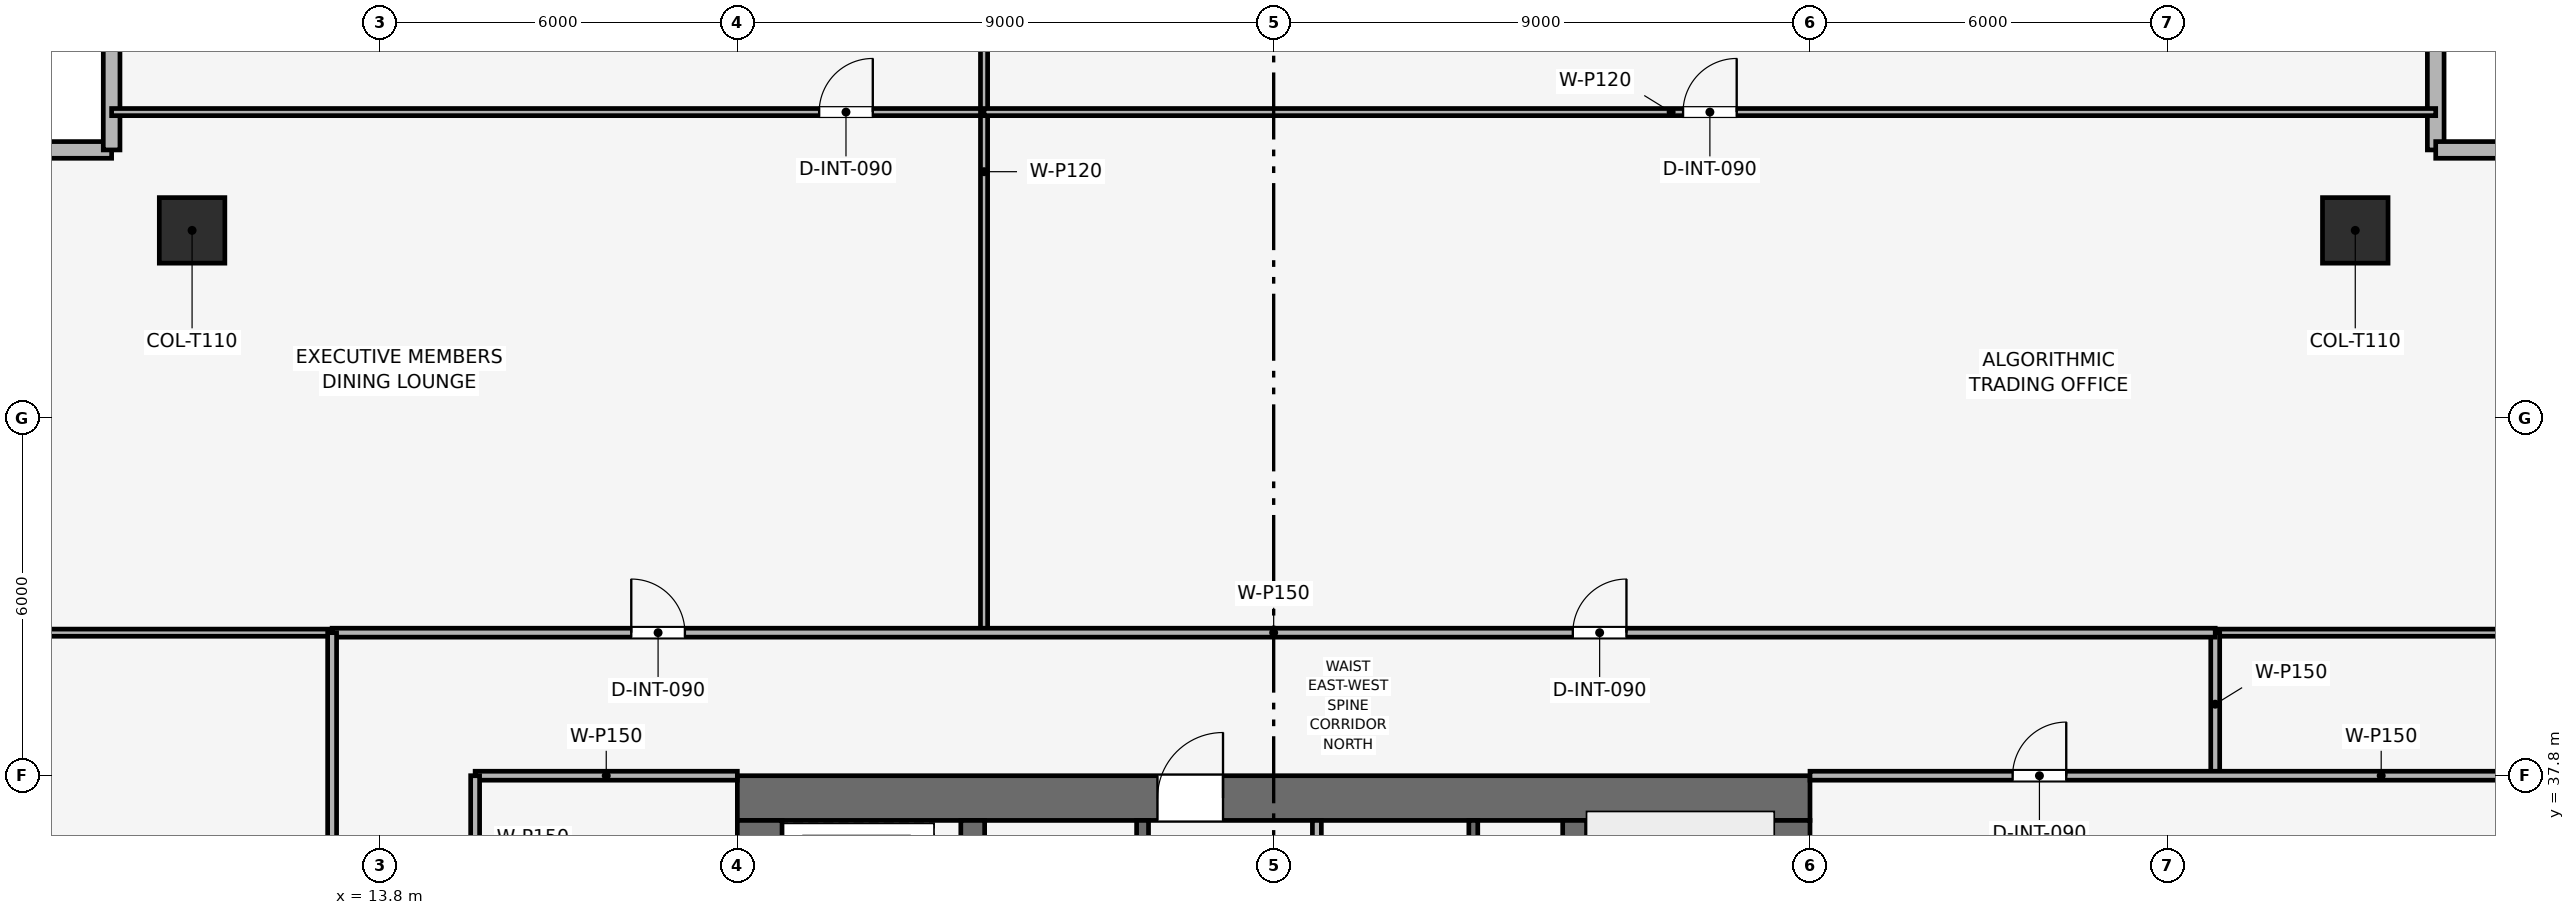
"""IFC4 building model, lengths in metres.
Left out: names, types, materials, properties, quantities, classifications, styles, units other than length and angle.
Written with IfcOpenShell. Run it as: python <this file> out.ifc"""

import sys

from ifc_helpers import new_model, si_unit, direction, frame, frame_2d, origin, origin_2d, place, context, subcontext, project, spatial, rectangle, extrude, element, fill, save


model = new_model("IFC4")
c1 = context("Model", 3, precision=1e-05, world=origin(), true_north=direction((0.0, 1.0)))
c2 = subcontext(c1, "Body", "Model", "MODEL_VIEW")
j1 = project(units=[si_unit("LENGTHUNIT", "METRE"), si_unit("PLANEANGLEUNIT", "RADIAN")], contexts=[c1])
p1 = place(None, origin())
s1 = spatial("IfcSite", under=j1, at=p1, CompositionType="ELEMENT")
p2 = place(p1, origin())
s2 = spatial("IfcBuilding", under=s1, at=p2, CompositionType="ELEMENT")
p3 = place(p2, frame((0.0, 0.0, 237.45)))
s3 = spatial("IfcBuildingStorey", under=s2, at=p3, CompositionType="ELEMENT", Elevation=237.45)
p4 = place(p3, frame((19.8, 37.425, 0.0), z_axis=(0.0, 0.0, 1.0), x_axis=(1.0, 0.0, 0.0)))
e1 = element("IfcWall", 1, at=p4, inside=s3, PredefinedType="SHEAR", context=c2, shape_type="SweptSolid", body=[
    extrude(rectangle(XDim=18.0, YDim=0.75, at=frame_2d((9.0, 0.0))), origin(), (0.0, 0.0, 1.0), 3.75),
])
p5 = place(p4, frame((7.05, 0.0, 0.0)))
e2 = element("IfcOpeningElement", 2, at=p5, cuts=e1, PredefinedType="OPENING", context=c2, shape_type="SweptSolid", body=[
    extrude(rectangle(XDim=1.1, YDim=2.15, at=frame_2d((0.55, 1.075))), frame((0.0, 0.385, 0.0), z_axis=(0.0, -1.0, 0.0), x_axis=(1.0, 0.0, 0.0)), (0.0, 0.0, 1.0), 0.77),
])
p6 = place(p3, frame((20.175, 20.55, 0.0), z_axis=(0.0, 0.0, 1.0), x_axis=(0.0, 1.0, 0.0)))
e3 = element("IfcWall", 3, at=p6, inside=s3, PredefinedType="SHEAR", context=c2, shape_type="SweptSolid", body=[
    extrude(rectangle(XDim=16.5, YDim=0.75, at=frame_2d((8.25, 0.0))), origin(), (0.0, 0.0, 1.0), 3.75),
])
p7 = place(p6, frame((10.25, 0.0, 0.0)))
e4 = element("IfcOpeningElement", 4, at=p7, cuts=e3, PredefinedType="OPENING", context=c2, shape_type="SweptSolid", body=[
    extrude(rectangle(XDim=1.1, YDim=2.15, at=frame_2d((0.55, 1.075))), frame((0.0, 0.385, 0.0), z_axis=(0.0, -1.0, 0.0), x_axis=(1.0, 0.0, 0.0)), (0.0, 0.0, 1.0), 0.77),
])
p8 = place(p3, frame((37.425, 20.55, 0.0), z_axis=(0.0, 0.0, 1.0), x_axis=(0.0, 1.0, 0.0)))
e5 = element("IfcWall", 5, at=p8, inside=s3, PredefinedType="SHEAR", context=c2, shape_type="SweptSolid", body=[
    extrude(rectangle(XDim=16.5, YDim=0.75, at=frame_2d((8.25, 0.0))), origin(), (0.0, 0.0, 1.0), 3.75),
])
p9 = place(p8, frame((4.75, 0.0, 0.0)))
e6 = element("IfcOpeningElement", 6, at=p9, cuts=e5, PredefinedType="OPENING", context=c2, shape_type="SweptSolid", body=[
    extrude(rectangle(XDim=1.1, YDim=2.15, at=frame_2d((0.55, 1.075))), frame((0.0, 0.385, 0.0), z_axis=(0.0, -1.0, 0.0), x_axis=(1.0, 0.0, 0.0)), (0.0, 0.0, 1.0), 0.77),
])
for number, where, z_axis, x_axis in (
    (7, (23.75, 20.55, 0.0), (0.0, 0.0, 1.0), (0.0, 1.0, 0.0)),
    (8, (33.85, 20.55, 0.0), (0.0, 0.0, 1.0), (0.0, 1.0, 0.0)),
):
    element("IfcWall", number, at=place(p3, frame(where, z_axis=z_axis, x_axis=x_axis)), inside=s3, PredefinedType="SHEAR", context=c2, shape_type="SweptSolid", body=[
        extrude(rectangle(XDim=16.5, YDim=0.4, at=frame_2d((8.25, 0.0))), origin(), (0.0, 0.0, 1.0), 3.75),
    ])
for number, where, z_axis, x_axis in (
    (9, (46.95, 46.95, 0.003), (0.0, 0.0, 1.0), (1.0, 0.0, 0.0)),
    (10, (10.65, 46.95, 0.003), (0.0, 0.0, 1.0), (1.0, 0.0, 0.0)),
):
    element("IfcColumn", number, at=place(p3, frame(where, z_axis=z_axis, x_axis=x_axis)), inside=s3, PredefinedType="COLUMN", context=c2, shape_type="SweptSolid", body=[
        extrude(rectangle(XDim=1.1, YDim=1.1, at=origin_2d()), origin(), (0.0, 0.0, 1.0), 3.494),
    ])
p10 = place(p3, frame((1.93, 48.3, 0.0), z_axis=(0.0, 0.0, 1.0), x_axis=(1.0, 0.0, 0.0)))
e11 = element("IfcWall", 11, at=p10, inside=s3, PredefinedType="SOLIDWALL", context=c2, shape_type="SweptSolid", body=[
    extrude(rectangle(XDim=7.37, YDim=0.28, at=frame_2d((3.685, 0.0))), origin(), (0.0, 0.0, 1.0), 3.5),
])
p11 = place(p10, frame((2.435, 0.0, 0.72)))
e12 = element("IfcOpeningElement", 12, at=p11, cuts=e11, PredefinedType="OPENING", context=c2, shape_type="SweptSolid", body=[
    extrude(rectangle(XDim=2.5, YDim=1.9, at=frame_2d((1.25, 0.95))), frame((0.0, 0.15, 0.0), z_axis=(0.0, -1.0, 0.0), x_axis=(1.0, 0.0, 0.0)), (0.0, 0.0, 1.0), 0.3),
])
p12 = place(p3, frame((9.3, 48.3, 0.0), z_axis=(0.0, 0.0, 1.0), x_axis=(0.0, 1.0, 0.0)))
e13 = element("IfcWall", 13, at=p12, inside=s3, PredefinedType="SOLIDWALL", context=c2, shape_type="SweptSolid", body=[
    extrude(rectangle(XDim=7.37, YDim=0.28, at=frame_2d((3.685, 0.0))), origin(), (0.0, 0.0, 1.0), 3.5),
])
p13 = place(p12, frame((2.435, 0.0, 0.72)))
e14 = element("IfcOpeningElement", 14, at=p13, cuts=e13, PredefinedType="OPENING", context=c2, shape_type="SweptSolid", body=[
    extrude(rectangle(XDim=2.5, YDim=1.9, at=frame_2d((1.25, 0.95))), frame((0.0, 0.15, 0.0), z_axis=(0.0, -1.0, 0.0), x_axis=(1.0, 0.0, 0.0)), (0.0, 0.0, 1.0), 0.3),
])
p14 = place(p3, frame((48.3, 55.67, 0.0), z_axis=(0.0, 0.0, 1.0), x_axis=(0.0, -1.0, 0.0)))
e15 = element("IfcWall", 15, at=p14, inside=s3, PredefinedType="SOLIDWALL", context=c2, shape_type="SweptSolid", body=[
    extrude(rectangle(XDim=7.37, YDim=0.28, at=frame_2d((3.685, 0.0))), origin(), (0.0, 0.0, 1.0), 3.5),
])
p15 = place(p14, frame((2.435, 0.0, 0.72)))
e16 = element("IfcOpeningElement", 16, at=p15, cuts=e15, PredefinedType="OPENING", context=c2, shape_type="SweptSolid", body=[
    extrude(rectangle(XDim=2.5, YDim=1.9, at=frame_2d((1.25, 0.95))), frame((0.0, 0.15, 0.0), z_axis=(0.0, -1.0, 0.0), x_axis=(1.0, 0.0, 0.0)), (0.0, 0.0, 1.0), 0.3),
])
p16 = place(p3, frame((48.3, 48.3, 0.0), z_axis=(0.0, 0.0, 1.0), x_axis=(1.0, 0.0, 0.0)))
e17 = element("IfcWall", 17, at=p16, inside=s3, PredefinedType="SOLIDWALL", context=c2, shape_type="SweptSolid", body=[
    extrude(rectangle(XDim=7.37, YDim=0.28, at=frame_2d((3.685, 0.0))), origin(), (0.0, 0.0, 1.0), 3.5),
])
p17 = place(p16, frame((2.435, 0.0, 0.72)))
e18 = element("IfcOpeningElement", 18, at=p17, cuts=e17, PredefinedType="OPENING", context=c2, shape_type="SweptSolid", body=[
    extrude(rectangle(XDim=2.5, YDim=1.9, at=frame_2d((1.25, 0.95))), frame((0.0, 0.15, 0.0), z_axis=(0.0, -1.0, 0.0), x_axis=(1.0, 0.0, 0.0)), (0.0, 0.0, 1.0), 0.3),
])
p18 = place(p3, frame((32.15, 34.0, 0.0), z_axis=(0.0, 0.0, 1.0), x_axis=(0.0, 1.0, 0.0)))
e19 = element("IfcWall", 19, at=p18, inside=s3, PredefinedType="SHEAR", context=c2, shape_type="SweptSolid", body=[
    extrude(rectangle(XDim=3.05, YDim=0.15, at=frame_2d((1.525, 0.0))), origin(), (0.0, 0.0, 1.0), 3.5),
])
p19 = place(p3, frame((26.6, 34.0, 0.0), z_axis=(0.0, 0.0, 1.0), x_axis=(0.0, 1.0, 0.0)))
e20 = element("IfcWall", 20, at=p19, inside=s3, PredefinedType="SHEAR", context=c2, shape_type="SweptSolid", body=[
    extrude(rectangle(XDim=3.05, YDim=0.2, at=frame_2d((1.525, 0.0))), origin(), (0.0, 0.0, 1.0), 3.5),
])
p20 = place(p19, frame((0.75, 0.0, 0.0)))
e21 = element("IfcOpeningElement", 21, at=p20, cuts=e20, PredefinedType="OPENING", context=c2, shape_type="SweptSolid", body=[
    extrude(rectangle(XDim=1.1, YDim=2.15, at=frame_2d((0.55, 1.075))), frame((0.0, 0.11, 0.0), z_axis=(0.0, -1.0, 0.0), x_axis=(1.0, 0.0, 0.0)), (0.0, 0.0, 1.0), 0.22),
])
p21 = place(p3, frame((29.525, 33.925, 0.0), z_axis=(0.0, 0.0, 1.0), x_axis=(0.0, 1.0, 0.0)))
e22 = element("IfcWall", 22, at=p21, inside=s3, PredefinedType="PARTITIONING", context=c2, shape_type="SweptSolid", body=[
    extrude(rectangle(XDim=3.125, YDim=0.15, at=frame_2d((1.562, 0.0))), origin(), (0.0, 0.0, 1.0), 3.5),
])
p22 = place(p21, frame((0.85, 0.0, 0.0)))
e23 = element("IfcOpeningElement", 23, at=p22, cuts=e22, PredefinedType="OPENING", context=c2, shape_type="SweptSolid", body=[
    extrude(rectangle(XDim=0.9, YDim=2.1, at=frame_2d((0.45, 1.05))), frame((0.0, 0.085, 0.0), z_axis=(0.0, -1.0, 0.0), x_axis=(1.0, 0.0, 0.0)), (0.0, 0.0, 1.0), 0.17),
])
p23 = place(p3, frame((15.4, 37.8, 0.0), z_axis=(0.0, 0.0, 1.0), x_axis=(1.0, 0.0, 0.0)))
e24 = element("IfcWall", 24, at=p23, inside=s3, PredefinedType="PARTITIONING", context=c2, shape_type="SweptSolid", body=[
    extrude(rectangle(XDim=4.4, YDim=0.15, at=frame_2d((2.2, 0.0))), origin(), (0.0, 0.0, 1.0), 3.035),
])
p24 = place(p3, frame((15.4, 32.45, 0.0), z_axis=(0.0, 0.0, 1.0), x_axis=(0.0, 1.0, 0.0)))
e25 = element("IfcWall", 25, at=p24, inside=s3, PredefinedType="PARTITIONING", context=c2, shape_type="SweptSolid", body=[
    extrude(rectangle(XDim=5.35, YDim=0.15, at=frame_2d((2.675, 0.0))), origin(), (0.0, 0.0, 1.0), 3.035),
])
p25 = place(p24, frame((2.1, 0.0, 0.0)))
e26 = element("IfcOpeningElement", 26, at=p25, cuts=e25, PredefinedType="OPENING", context=c2, shape_type="SweptSolid", body=[
    extrude(rectangle(XDim=0.9, YDim=2.1, at=frame_2d((0.45, 1.05))), frame((0.0, 0.085, 0.0), z_axis=(0.0, -1.0, 0.0), x_axis=(1.0, 0.0, 0.0)), (0.0, 0.0, 1.0), 0.17),
])
p26 = place(p3, frame((9.3, 48.935, 0.0), z_axis=(0.0, 0.0, 1.0), x_axis=(1.0, 0.0, 0.0)))
e27 = element("IfcWall", 27, at=p26, inside=s3, PredefinedType="PARTITIONING", context=c2, shape_type="SweptSolid", body=[
    extrude(rectangle(XDim=14.64, YDim=0.12, at=frame_2d((7.32, 0.0))), origin(), (0.0, 0.0, 1.0), 2.685),
])
p27 = place(p26, frame((11.873, 0.0, 0.0)))
e28 = element("IfcOpeningElement", 28, at=p27, cuts=e27, PredefinedType="OPENING", context=c2, shape_type="SweptSolid", body=[
    extrude(rectangle(XDim=0.9, YDim=2.1, at=frame_2d((0.45, 1.05))), frame((0.0, 0.07, 0.0), z_axis=(0.0, -1.0, 0.0), x_axis=(1.0, 0.0, 0.0)), (0.0, 0.0, 1.0), 0.14),
])
p28 = place(p3, frame((23.94, 40.2, 0.0), z_axis=(0.0, 0.0, 1.0), x_axis=(0.0, 1.0, 0.0)))
e29 = element("IfcWall", 29, at=p28, inside=s3, PredefinedType="PARTITIONING", context=c2, shape_type="SweptSolid", body=[
    extrude(rectangle(XDim=15.47, YDim=0.12, at=frame_2d((7.735, 0.0))), origin(), (0.0, 0.0, 1.0), 2.685),
])
p29 = place(p3, frame((23.94, 48.935, 0.0), z_axis=(0.0, 0.0, 1.0), x_axis=(1.0, 0.0, 0.0)))
e30 = element("IfcWall", 30, at=p29, inside=s3, PredefinedType="PARTITIONING", context=c2, shape_type="SweptSolid", body=[
    extrude(rectangle(XDim=24.36, YDim=0.12, at=frame_2d((12.18, 0.0))), origin(), (0.0, 0.0, 1.0), 2.685),
])
p30 = place(p29, frame((11.73, 0.0, 0.0)))
e31 = element("IfcOpeningElement", 31, at=p30, cuts=e30, PredefinedType="OPENING", context=c2, shape_type="SweptSolid", body=[
    extrude(rectangle(XDim=0.9, YDim=2.1, at=frame_2d((0.45, 1.05))), frame((0.0, 0.07, 0.0), z_axis=(0.0, -1.0, 0.0), x_axis=(1.0, 0.0, 0.0)), (0.0, 0.0, 1.0), 0.14),
])
p31 = place(p3, frame((1.93, 40.2, 0.0), z_axis=(0.0, 0.0, 1.0), x_axis=(1.0, 0.0, 0.0)))
e32 = element("IfcWall", 32, at=p31, inside=s3, PredefinedType="PARTITIONING", context=c2, shape_type="SweptSolid", body=[
    extrude(rectangle(XDim=11.07, YDim=0.12, at=frame_2d((5.535, 0.0))), origin(), (0.0, 0.0, 1.0), 2.685),
])
p32 = place(p3, frame((44.6, 40.2, 0.0), z_axis=(0.0, 0.0, 1.0), x_axis=(1.0, 0.0, 0.0)))
e33 = element("IfcWall", 33, at=p32, inside=s3, PredefinedType="PARTITIONING", context=c2, shape_type="SweptSolid", body=[
    extrude(rectangle(XDim=11.07, YDim=0.12, at=frame_2d((5.535, 0.0))), origin(), (0.0, 0.0, 1.0), 2.685),
])
p33 = place(p3, frame((44.6, 37.8, 0.0), z_axis=(0.0, 0.0, 1.0), x_axis=(0.0, 1.0, 0.0)))
e34 = element("IfcWall", 34, at=p33, inside=s3, PredefinedType="PARTITIONING", context=c2, shape_type="SweptSolid", body=[
    extrude(rectangle(XDim=2.4, YDim=0.15, at=frame_2d((1.2, 0.0))), origin(), (0.0, 0.0, 1.0), 3.5),
])
p34 = place(p3, frame((37.8, 37.8, 0.0), z_axis=(0.0, 0.0, 1.0), x_axis=(1.0, 0.0, 0.0)))
e35 = element("IfcWall", 35, at=p34, inside=s3, PredefinedType="PARTITIONING", context=c2, shape_type="SweptSolid", body=[
    extrude(rectangle(XDim=17.87, YDim=0.15, at=frame_2d((8.935, 0.0))), origin(), (0.0, 0.0, 1.0), 2.685),
])
p35 = place(p34, frame((3.4, 0.0, 0.0)))
e36 = element("IfcOpeningElement", 36, at=p35, cuts=e35, PredefinedType="OPENING", context=c2, shape_type="SweptSolid", body=[
    extrude(rectangle(XDim=0.9, YDim=2.1, at=frame_2d((0.45, 1.05))), frame((0.0, 0.085, 0.0), z_axis=(0.0, -1.0, 0.0), x_axis=(1.0, 0.0, 0.0)), (0.0, 0.0, 1.0), 0.17),
])
p36 = place(p3, frame((13.0, 40.2, 0.0), z_axis=(0.0, 0.0, 1.0), x_axis=(1.0, 0.0, 0.0)))
e37 = element("IfcWall", 37, at=p36, inside=s3, PredefinedType="PARTITIONING", context=c2, shape_type="SweptSolid", body=[
    extrude(rectangle(XDim=31.6, YDim=0.15, at=frame_2d((15.8, 0.0))), origin(), (0.0, 0.0, 1.0), 3.035),
])
p37 = place(p36, frame((5.02, 0.0, 0.0)))
e38 = element("IfcOpeningElement", 38, at=p37, cuts=e37, PredefinedType="OPENING", context=c2, shape_type="SweptSolid", body=[
    extrude(rectangle(XDim=0.9, YDim=2.1, at=frame_2d((0.45, 1.05))), frame((0.0, 0.085, 0.0), z_axis=(0.0, -1.0, 0.0), x_axis=(1.0, 0.0, 0.0)), (0.0, 0.0, 1.0), 0.17),
])
p38 = place(p36, frame((20.82, 0.0, 0.0)))
e39 = element("IfcOpeningElement", 39, at=p38, cuts=e37, PredefinedType="OPENING", context=c2, shape_type="SweptSolid", body=[
    extrude(rectangle(XDim=0.9, YDim=2.1, at=frame_2d((0.45, 1.05))), frame((0.0, 0.085, 0.0), z_axis=(0.0, -1.0, 0.0), x_axis=(1.0, 0.0, 0.0)), (0.0, 0.0, 1.0), 0.17),
])
p39 = place(p3, frame((13.0, 17.4, 0.0), z_axis=(0.0, 0.0, 1.0), x_axis=(0.0, 1.0, 0.0)))
e40 = element("IfcWall", 40, at=p39, inside=s3, PredefinedType="PARTITIONING", context=c2, shape_type="SweptSolid", body=[
    extrude(rectangle(XDim=22.8, YDim=0.15, at=frame_2d((11.4, 0.0))), origin(), (0.0, 0.0, 1.0), 3.035),
])
p40 = place(p39, frame((3.1, 0.0, 0.0)))
e41 = element("IfcOpeningElement", 41, at=p40, cuts=e40, PredefinedType="OPENING", context=c2, shape_type="SweptSolid", body=[
    extrude(rectangle(XDim=0.9, YDim=2.1, at=frame_2d((0.45, 1.05))), frame((0.0, 0.085, 0.0), z_axis=(0.0, -1.0, 0.0), x_axis=(1.0, 0.0, 0.0)), (0.0, 0.0, 1.0), 0.17),
])
p41 = place(p39, frame((7.685, 0.0, 0.0)))
e42 = element("IfcOpeningElement", 42, at=p41, cuts=e40, PredefinedType="OPENING", context=c2, shape_type="SweptSolid", body=[
    extrude(rectangle(XDim=0.9, YDim=2.1, at=frame_2d((0.45, 1.05))), frame((0.0, 0.085, 0.0), z_axis=(0.0, -1.0, 0.0), x_axis=(1.0, 0.0, 0.0)), (0.0, 0.0, 1.0), 0.17),
])
p42 = place(p39, frame((15.535, 0.0, 0.0)))
e43 = element("IfcOpeningElement", 43, at=p42, cuts=e40, PredefinedType="OPENING", context=c2, shape_type="SweptSolid", body=[
    extrude(rectangle(XDim=0.9, YDim=2.1, at=frame_2d((0.45, 1.05))), frame((0.0, 0.085, 0.0), z_axis=(0.0, -1.0, 0.0), x_axis=(1.0, 0.0, 0.0)), (0.0, 0.0, 1.0), 0.17),
])
p43 = place(p27, origin())
e44 = element("IfcDoor", 44, at=p43, inside=s3, OperationType="SINGLE_SWING_RIGHT", PredefinedType="DOOR", context=c2, shape_type="SweptSolid", body=[
    extrude(rectangle(XDim=0.9, YDim=2.1, at=frame_2d((0.45, 1.05))), frame((0.0, 0.025, 0.0), z_axis=(0.0, -1.0, 0.0), x_axis=(1.0, 0.0, 0.0)), (0.0, 0.0, 1.0), 0.05),
])
fill(e28, e44)
p44 = place(p30, origin())
e45 = element("IfcDoor", 45, at=p44, inside=s3, OperationType="SINGLE_SWING_RIGHT", PredefinedType="DOOR", context=c2, shape_type="SweptSolid", body=[
    extrude(rectangle(XDim=0.9, YDim=2.1, at=frame_2d((0.45, 1.05))), frame((0.0, 0.025, 0.0), z_axis=(0.0, -1.0, 0.0), x_axis=(1.0, 0.0, 0.0)), (0.0, 0.0, 1.0), 0.05),
])
fill(e31, e45)
p45 = place(p35, origin())
e46 = element("IfcDoor", 46, at=p45, inside=s3, OperationType="SINGLE_SWING_RIGHT", PredefinedType="DOOR", context=c2, shape_type="SweptSolid", body=[
    extrude(rectangle(XDim=0.9, YDim=2.1, at=frame_2d((0.45, 1.05))), frame((0.0, 0.025, 0.0), z_axis=(0.0, -1.0, 0.0), x_axis=(1.0, 0.0, 0.0)), (0.0, 0.0, 1.0), 0.05),
])
fill(e36, e46)
p46 = place(p37, origin())
e47 = element("IfcDoor", 47, at=p46, inside=s3, OperationType="SINGLE_SWING_LEFT", PredefinedType="DOOR", context=c2, shape_type="SweptSolid", body=[
    extrude(rectangle(XDim=0.9, YDim=2.1, at=frame_2d((0.45, 1.05))), frame((0.0, 0.025, 0.0), z_axis=(0.0, -1.0, 0.0), x_axis=(1.0, 0.0, 0.0)), (0.0, 0.0, 1.0), 0.05),
])
fill(e38, e47)
p47 = place(p38, origin())
e48 = element("IfcDoor", 48, at=p47, inside=s3, OperationType="SINGLE_SWING_RIGHT", PredefinedType="DOOR", context=c2, shape_type="SweptSolid", body=[
    extrude(rectangle(XDim=0.9, YDim=2.1, at=frame_2d((0.45, 1.05))), frame((0.0, 0.025, 0.0), z_axis=(0.0, -1.0, 0.0), x_axis=(1.0, 0.0, 0.0)), (0.0, 0.0, 1.0), 0.05),
])
fill(e39, e48)
p48 = place(p5, origin())
e49 = element("IfcDoor", 49, at=p48, inside=s3, OperationType="SINGLE_SWING_RIGHT", PredefinedType="DOOR", context=c2, shape_type="SweptSolid", body=[
    extrude(rectangle(XDim=1.1, YDim=2.15, at=frame_2d((0.55, 1.075))), frame((0.0, 0.025, 0.0), z_axis=(0.0, -1.0, 0.0), x_axis=(1.0, 0.0, 0.0)), (0.0, 0.0, 1.0), 0.05),
])
fill(e2, e49)
save(model, sys.argv[1])
